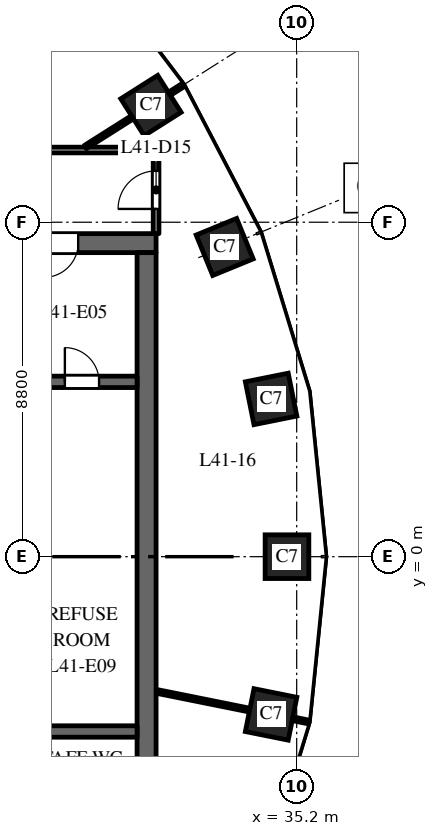
"""IFC4 building model, lengths in metres.
Left out: names, types, materials, properties, quantities, classifications, styles, units other than length and angle.
Written with IfcOpenShell. Run it as: python <this file> out.ifc"""

import sys

from ifc_helpers import new_model, si_unit, direction, frame, frame_2d, origin, origin_2d, place, context, subcontext, project, spatial, rectangle, extrude, element, fill, save


model = new_model("IFC4")
c1 = context("Model", 3, precision=1e-05, world=origin(), true_north=direction((0.0, 1.0)))
c2 = subcontext(c1, "Body", "Model", "MODEL_VIEW")
j1 = project(units=[si_unit("LENGTHUNIT", "METRE"), si_unit("PLANEANGLEUNIT", "RADIAN")], contexts=[c1])
p1 = place(None, origin())
s1 = spatial("IfcSite", under=j1, at=p1, CompositionType="ELEMENT")
p2 = place(p1, origin())
s2 = spatial("IfcBuilding", under=s1, at=p2, CompositionType="ELEMENT")
p3 = place(p2, frame((0.0, 0.0, 178.0)))
s3 = spatial("IfcBuildingStorey", under=s2, at=p3, CompositionType="ELEMENT", Elevation=178.0)
for number, where, z_axis, x_axis in (
    (1, (34.945, 0.0, 0.0), (0.0, 0.0, 1.0), (0.0, 1.0, 0.0)),
    (2, (34.527, 4.151, 0.0), (0.0, 0.0, 1.0), (-0.197, 0.98, 0.0)),
    (3, (33.305, 8.149, 0.0), (0.0, 0.0, 1.0), (-0.379, 0.925, 0.0)),
    (4, (31.365, 11.871, 0.0), (0.0, 0.0, 1.0), (-0.535, 0.845, 0.0)),
    (5, (34.527, -4.151, 0.0), (0.0, 0.0, 1.0), (0.197, 0.98, 0.0)),
):
    element("IfcColumn", number, at=place(p3, frame(where, z_axis=z_axis, x_axis=x_axis)), inside=s3, PredefinedType="COLUMN", context=c2, shape_type="SweptSolid", body=[
        extrude(rectangle(XDim=1.15, YDim=1.15, at=origin_2d()), origin(), (0.0, 0.0, 1.0), 4.0),
    ])
p4 = place(p3, frame((16.5, 8.25, 0.0), z_axis=(0.0, 0.0, 1.0), x_axis=(1.0, 0.0, 0.0)))
e6 = element("IfcWall", 6, at=p4, inside=s3, PredefinedType="SHEAR", context=c2, shape_type="SweptSolid", body=[
    extrude(rectangle(XDim=15.0, YDim=0.5, at=frame_2d((7.5, 0.0))), origin(), (0.0, 0.0, 1.0), 3.7),
])
p5 = place(p4, frame((6.9, 0.0, 0.0)))
e7 = element("IfcOpeningElement", 7, at=p5, cuts=e6, PredefinedType="OPENING", context=c2, shape_type="SweptSolid", body=[
    extrude(rectangle(XDim=1.2, YDim=2.1, at=frame_2d((0.6, 1.05))), frame((0.0, 0.26, 0.0), z_axis=(0.0, -1.0, 0.0), x_axis=(1.0, 0.0, 0.0)), (0.0, 0.0, 1.0), 0.52),
])
p6 = place(p4, frame((12.05, 0.0, 0.0)))
e8 = element("IfcOpeningElement", 8, at=p6, cuts=e6, PredefinedType="OPENING", context=c2, shape_type="SweptSolid", body=[
    extrude(rectangle(XDim=0.9, YDim=2.1, at=frame_2d((0.45, 1.05))), frame((0.0, 0.26, 0.0), z_axis=(0.0, -1.0, 0.0), x_axis=(1.0, 0.0, 0.0)), (0.0, 0.0, 1.0), 0.52),
])
p7 = place(p3, frame((31.25, -8.0, 0.0), z_axis=(0.0, 0.0, 1.0), x_axis=(0.0, 1.0, 0.0)))
e9 = element("IfcWall", 9, at=p7, inside=s3, PredefinedType="SHEAR", context=c2, shape_type="SweptSolid", body=[
    extrude(rectangle(XDim=16.0, YDim=0.5, at=frame_2d((8.0, 0.0))), origin(), (0.0, 0.0, 1.0), 3.7),
])
p8 = place(p3, frame((24.9, 4.6, 0.0), z_axis=(0.0, 0.0, 1.0), x_axis=(1.0, 0.0, 0.0)))
e10 = element("IfcWall", 10, at=p8, inside=s3, PredefinedType="SHEAR", context=c2, shape_type="SweptSolid", body=[
    extrude(rectangle(XDim=6.1, YDim=0.3, at=frame_2d((3.05, 0.0))), origin(), (0.0, 0.0, 1.0), 3.7),
])
p9 = place(p8, frame((4.2, 0.0, 0.0)))
e11 = element("IfcOpeningElement", 11, at=p9, cuts=e10, PredefinedType="OPENING", context=c2, shape_type="SweptSolid", body=[
    extrude(rectangle(XDim=0.9, YDim=2.1, at=frame_2d((0.45, 1.05))), frame((0.0, 0.16, 0.0), z_axis=(0.0, -1.0, 0.0), x_axis=(1.0, 0.0, 0.0)), (0.0, 0.0, 1.0), 0.32),
])
p10 = place(p3, frame((24.9, -4.6, 0.0), z_axis=(0.0, 0.0, 1.0), x_axis=(1.0, 0.0, 0.0)))
e12 = element("IfcWall", 12, at=p10, inside=s3, PredefinedType="SHEAR", context=c2, shape_type="SweptSolid", body=[
    extrude(rectangle(XDim=6.1, YDim=0.3, at=frame_2d((3.05, 0.0))), origin(), (0.0, 0.0, 1.0), 3.7),
])
p11 = place(p3, frame((16.5, 10.7, 0.0), z_axis=(0.0, 0.0, 1.0), x_axis=(1.0, 0.0, 0.0)))
e13 = element("IfcWall", 13, at=p11, inside=s3, PredefinedType="PARTITIONING", context=c2, shape_type="SweptSolid", body=[
    extrude(rectangle(XDim=15.0, YDim=0.15, at=frame_2d((7.5, 0.0))), origin(), (0.0, 0.0, 1.0), 2.75),
])
p12 = place(p11, frame((4.621, 0.0, 0.0)))
e14 = element("IfcOpeningElement", 14, at=p12, cuts=e13, PredefinedType="OPENING", context=c2, shape_type="SweptSolid", body=[
    extrude(rectangle(XDim=1.0, YDim=2.1, at=frame_2d((0.5, 1.05))), frame((0.0, 0.085, 0.0), z_axis=(0.0, -1.0, 0.0), x_axis=(1.0, 0.0, 0.0)), (0.0, 0.0, 1.0), 0.17),
])
p13 = place(p3, frame((29.637, 10.777, 0.0), z_axis=(0.0, 0.0, 1.0), x_axis=(0.844810627195, 0.535065420467, 0.0)))
e15 = element("IfcWall", 15, at=p13, inside=s3, PredefinedType="PARTITIONING", context=c2, shape_type="SweptSolid", body=[
    extrude(rectangle(XDim=3.048, YDim=0.1, at=frame_2d((1.524, 0.0))), origin(), (0.0, 0.0, 1.0), 2.9),
])
p14 = place(p3, frame((31.5, -3.542, 0.0), z_axis=(0.0, 0.0, 1.0), x_axis=(0.980357474535, -0.197228857227, 0.0)))
e16 = element("IfcWall", 16, at=p14, inside=s3, PredefinedType="PARTITIONING", context=c2, shape_type="SweptSolid", body=[
    extrude(rectangle(XDim=4.092, YDim=0.1, at=frame_2d((2.046, 0.0))), origin(), (0.0, 0.0, 1.0), 2.9),
])
p15 = place(p3, frame((31.5, 8.5, 0.0), z_axis=(0.0, 0.0, 1.0), x_axis=(0.0, 1.0, 0.0)))
e17 = element("IfcWall", 17, at=p15, inside=s3, PredefinedType="PARTITIONING", context=c2, shape_type="SweptSolid", body=[
    extrude(rectangle(XDim=2.2, YDim=0.15, at=frame_2d((1.1, 0.0))), origin(), (0.0, 0.0, 1.0), 2.9),
])
p16 = place(p15, frame((0.65, 0.0, 0.0)))
e18 = element("IfcOpeningElement", 18, at=p16, cuts=e17, PredefinedType="OPENING", context=c2, shape_type="SweptSolid", body=[
    extrude(rectangle(XDim=1.0, YDim=2.1, at=frame_2d((0.5, 1.05))), frame((0.0, 0.085, 0.0), z_axis=(0.0, -1.0, 0.0), x_axis=(1.0, 0.0, 0.0)), (0.0, 0.0, 1.0), 0.17),
])
p17 = place(p6, origin())
e19 = element("IfcDoor", 19, at=p17, inside=s3, OperationType="SINGLE_SWING_LEFT", PredefinedType="DOOR", context=c2, shape_type="SweptSolid", body=[
    extrude(rectangle(XDim=0.9, YDim=2.1, at=frame_2d((0.45, 1.05))), frame((0.0, 0.025, 0.0), z_axis=(0.0, -1.0, 0.0), x_axis=(1.0, 0.0, 0.0)), (0.0, 0.0, 1.0), 0.05),
])
fill(e8, e19)
p18 = place(p9, origin())
e20 = element("IfcDoor", 20, at=p18, inside=s3, OperationType="SINGLE_SWING_RIGHT", PredefinedType="DOOR", context=c2, shape_type="SweptSolid", body=[
    extrude(rectangle(XDim=0.9, YDim=2.1, at=frame_2d((0.45, 1.05))), frame((0.0, 0.025, 0.0), z_axis=(0.0, -1.0, 0.0), x_axis=(1.0, 0.0, 0.0)), (0.0, 0.0, 1.0), 0.05),
])
fill(e11, e20)
p19 = place(p16, origin())
e21 = element("IfcDoor", 21, at=p19, inside=s3, OperationType="SINGLE_SWING_LEFT", PredefinedType="DOOR", context=c2, shape_type="SweptSolid", body=[
    extrude(rectangle(XDim=1.0, YDim=2.1, at=frame_2d((0.5, 1.05))), frame((0.0, 0.025, 0.0), z_axis=(0.0, -1.0, 0.0), x_axis=(1.0, 0.0, 0.0)), (0.0, 0.0, 1.0), 0.05),
])
fill(e18, e21)
save(model, sys.argv[1])
